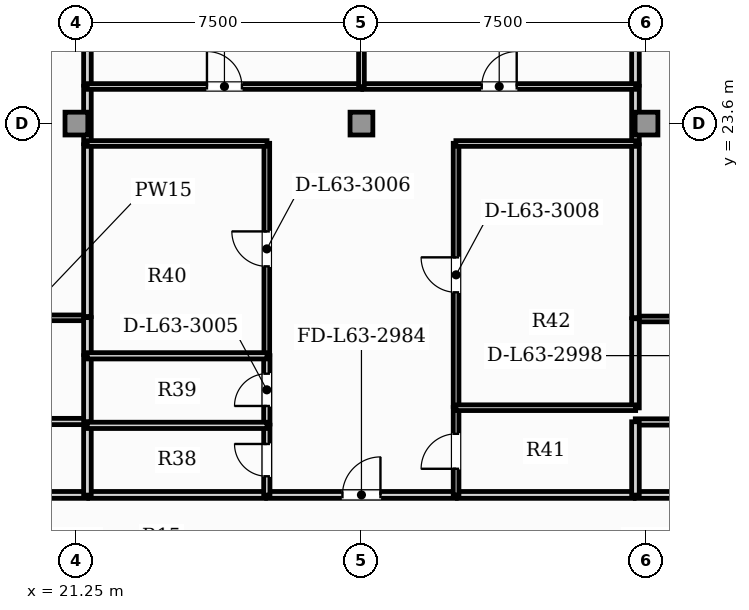
"""IFC4 building model, lengths in metres.
Left out: names, types, materials, properties, quantities, classifications, styles, units other than length and angle.
Written with IfcOpenShell. Run it as: python <this file> out.ifc"""

import sys

from ifc_helpers import new_model, si_unit, direction, frame, frame_2d, origin, origin_2d, place, context, subcontext, project, spatial, rectangle, extrude, element, fill, save


model = new_model("IFC4")
c1 = context("Model", 3, precision=1e-05, world=origin(), true_north=direction((0.0, 1.0)))
c2 = subcontext(c1, "Body", "Model", "MODEL_VIEW")
j1 = project(units=[si_unit("LENGTHUNIT", "METRE"), si_unit("PLANEANGLEUNIT", "RADIAN")], contexts=[c1])
p1 = place(None, origin())
s1 = spatial("IfcSite", under=j1, at=p1, CompositionType="ELEMENT")
p2 = place(p1, origin())
s2 = spatial("IfcBuilding", under=s1, at=p2, CompositionType="ELEMENT")
p3 = place(p2, frame((0.0, 0.0, 256.75)))
s3 = spatial("IfcBuildingStorey", under=s2, at=p3, CompositionType="ELEMENT", Elevation=256.75)
for number, where, z_axis, x_axis in (
    (1, (21.25, 23.6, 0.0), (0.0, 0.0, 1.0), (1.0, 0.0, 0.0)),
    (2, (28.75, 23.6, 0.0), (0.0, 0.0, 1.0), (1.0, 0.0, 0.0)),
    (3, (36.25, 23.6, 0.0), (0.0, 0.0, 1.0), (1.0, 0.0, 0.0)),
):
    element("IfcColumn", number, at=place(p3, frame(where, z_axis=z_axis, x_axis=x_axis)), inside=s3, PredefinedType="COLUMN", context=c2, shape_type="SweptSolid", body=[
        extrude(rectangle(XDim=0.6, YDim=0.6, at=origin_2d()), origin(), (0.0, 0.0, 1.0), 3.85),
    ])
p4 = place(p3, frame((17.627, 13.83, 0.0), z_axis=(0.0, 0.0, 1.0), x_axis=(1.0, 0.0, 0.0)))
e4 = element("IfcWall", 4, at=p4, inside=s3, PredefinedType="PARTITIONING", context=c2, shape_type="SweptSolid", body=[
    extrude(rectangle(XDim=3.918, YDim=0.18, at=frame_2d((1.959, 0.0))), origin(), (0.0, 0.0, 1.0), 3.65),
])
p5 = place(p3, frame((35.955, 13.83, 0.0), z_axis=(0.0, 0.0, 1.0), x_axis=(1.0, 0.0, 0.0)))
e5 = element("IfcWall", 5, at=p5, inside=s3, PredefinedType="PARTITIONING", context=c2, shape_type="SweptSolid", body=[
    extrude(rectangle(XDim=3.944, YDim=0.18, at=frame_2d((1.972, 0.0))), origin(), (0.0, 0.0, 1.0), 3.65),
])
p6 = place(p3, frame((26.255, 13.83, 0.0), z_axis=(0.0, 0.0, 1.0), x_axis=(1.0, 0.0, 0.0)))
e6 = element("IfcWall", 6, at=p6, inside=s3, PredefinedType="PARTITIONING", context=c2, shape_type="SweptSolid", body=[
    extrude(rectangle(XDim=4.99, YDim=0.18, at=frame_2d((2.495, 0.0))), origin(), (0.0, 0.0, 1.0), 3.65),
])
p7 = place(p6, frame((1.995, 0.0, 0.0)))
e7 = element("IfcOpeningElement", 7, at=p7, cuts=e6, PredefinedType="OPENING", context=c2, shape_type="SweptSolid", body=[
    extrude(rectangle(XDim=1.0, YDim=2.15, at=frame_2d((0.5, 1.075))), frame((0.0, 0.1, 0.0), z_axis=(0.0, -1.0, 0.0), x_axis=(1.0, 0.0, 0.0)), (0.0, 0.0, 1.0), 0.2),
])
for number, where, z_axis, x_axis in (
    (8, (21.575, 13.83, 0.0), (0.0, 0.0, 1.0), (1.0, 0.0, 0.0)),
    (9, (31.275, 13.83, 0.0), (0.0, 0.0, 1.0), (1.0, 0.0, 0.0)),
):
    element("IfcWall", number, at=place(p3, frame(where, z_axis=z_axis, x_axis=x_axis)), inside=s3, PredefinedType="PARTITIONING", context=c2, shape_type="SweptSolid", body=[
        extrude(rectangle(XDim=4.65, YDim=0.18, at=frame_2d((2.325, 0.0))), origin(), (0.0, 0.0, 1.0), 3.65),
    ])
p8 = place(p3, frame((17.587, 15.762, 0.0), z_axis=(0.0, 0.0, 1.0), x_axis=(1.0, 0.0, 0.0)))
e10 = element("IfcWall", 10, at=p8, inside=s3, PredefinedType="PLUMBINGWALL", context=c2, shape_type="SweptSolid", body=[
    extrude(rectangle(XDim=3.958, YDim=0.165, at=frame_2d((1.979, 0.0))), origin(), (0.0, 0.0, 1.0), 3.65),
])
p9 = place(p3, frame((21.54, 13.825, 0.0), z_axis=(0.0, 0.0, 1.0), x_axis=(0.0, 1.0, 0.0)))
e11 = element("IfcWall", 11, at=p9, inside=s3, PredefinedType="PARTITIONING", context=c2, shape_type="SweptSolid", body=[
    extrude(rectangle(XDim=1.84, YDim=0.2, at=frame_2d((0.92, 0.0))), origin(), (0.0, 0.0, 1.0), 3.65),
])
p10 = place(p3, frame((17.587, 18.49, 0.0), z_axis=(0.0, 0.0, 1.0), x_axis=(1.0, 0.0, 0.0)))
e12 = element("IfcWall", 12, at=p10, inside=s3, PredefinedType="PARTITIONING", context=c2, shape_type="SweptSolid", body=[
    extrude(rectangle(XDim=3.958, YDim=0.15, at=frame_2d((1.979, 0.0))), origin(), (0.0, 0.0, 1.0), 3.65),
])
p11 = place(p3, frame((21.54, 15.757, 0.0), z_axis=(0.0, 0.0, 1.0), x_axis=(0.0, 1.0, 0.0)))
e13 = element("IfcWall", 13, at=p11, inside=s3, PredefinedType="PARTITIONING", context=c2, shape_type="SweptSolid", body=[
    extrude(rectangle(XDim=1.739, YDim=0.2, at=frame_2d((0.869, 0.0))), origin(), (0.0, 0.0, 1.0), 3.65),
])
p12 = place(p3, frame((21.54, 17.525, 0.0), z_axis=(0.0, 0.0, 1.0), x_axis=(0.0, 1.0, 0.0)))
e14 = element("IfcWall", 14, at=p12, inside=s3, PredefinedType="PARTITIONING", context=c2, shape_type="SweptSolid", body=[
    extrude(rectangle(XDim=0.969, YDim=0.2, at=frame_2d((0.485, 0.0))), origin(), (0.0, 0.0, 1.0), 3.65),
])
p13 = place(p3, frame((21.54, 23.071, 0.0), z_axis=(0.0, 0.0, 1.0), x_axis=(0.0, 1.0, 0.0)))
e15 = element("IfcWall", 15, at=p13, inside=s3, PredefinedType="PARTITIONING", context=c2, shape_type="SweptSolid", body=[
    extrude(rectangle(XDim=1.51, YDim=0.2, at=frame_2d((0.755, 0.0))), origin(), (0.0, 0.0, 1.0), 3.65),
])
p14 = place(p3, frame((21.54, 18.524, 0.0), z_axis=(0.0, 0.0, 1.0), x_axis=(0.0, 1.0, 0.0)))
e16 = element("IfcWall", 16, at=p14, inside=s3, PredefinedType="PARTITIONING", context=c2, shape_type="SweptSolid", body=[
    extrude(rectangle(XDim=4.517, YDim=0.2, at=frame_2d((2.258, 0.0))), origin(), (0.0, 0.0, 1.0), 3.65),
])
p15 = place(p3, frame((21.54, 24.611, 0.0), z_axis=(0.0, 0.0, 1.0), x_axis=(0.0, 1.0, 0.0)))
e17 = element("IfcWall", 17, at=p15, inside=s3, PredefinedType="PARTITIONING", context=c2, shape_type="SweptSolid", body=[
    extrude(rectangle(XDim=2.354, YDim=0.2, at=frame_2d((1.177, 0.0))), origin(), (0.0, 0.0, 1.0), 3.65),
])
p16 = place(p3, frame((35.955, 15.75, 0.0), z_axis=(0.0, 0.0, 1.0), x_axis=(1.0, 0.0, 0.0)))
e18 = element("IfcWall", 18, at=p16, inside=s3, PredefinedType="PLUMBINGWALL", context=c2, shape_type="SweptSolid", body=[
    extrude(rectangle(XDim=3.984, YDim=0.165, at=frame_2d((1.992, 0.0))), origin(), (0.0, 0.0, 1.0), 3.65),
])
p17 = place(p3, frame((35.96, 13.825, 0.0), z_axis=(0.0, 0.0, 1.0), x_axis=(0.0, 1.0, 0.0)))
e19 = element("IfcWall", 19, at=p17, inside=s3, PredefinedType="PARTITIONING", context=c2, shape_type="SweptSolid", body=[
    extrude(rectangle(XDim=1.929, YDim=0.2, at=frame_2d((0.965, 0.0))), origin(), (0.0, 0.0, 1.0), 3.65),
])
p18 = place(p3, frame((35.955, 18.46, 0.0), z_axis=(0.0, 0.0, 1.0), x_axis=(1.0, 0.0, 0.0)))
e20 = element("IfcWall", 20, at=p18, inside=s3, PredefinedType="PARTITIONING", context=c2, shape_type="SweptSolid", body=[
    extrude(rectangle(XDim=3.984, YDim=0.15, at=frame_2d((1.992, 0.0))), origin(), (0.0, 0.0, 1.0), 3.65),
])
p19 = place(p3, frame((35.96, 16.119, 0.0), z_axis=(0.0, 0.0, 1.0), x_axis=(0.0, 1.0, 0.0)))
e21 = element("IfcWall", 21, at=p19, inside=s3, PredefinedType="PARTITIONING", context=c2, shape_type="SweptSolid", body=[
    extrude(rectangle(XDim=2.345, YDim=0.2, at=frame_2d((1.173, 0.0))), origin(), (0.0, 0.0, 1.0), 3.65),
])
p20 = place(p3, frame((35.96, 23.071, 0.0), z_axis=(0.0, 0.0, 1.0), x_axis=(0.0, 1.0, 0.0)))
e22 = element("IfcWall", 22, at=p20, inside=s3, PredefinedType="PARTITIONING", context=c2, shape_type="SweptSolid", body=[
    extrude(rectangle(XDim=1.51, YDim=0.2, at=frame_2d((0.755, 0.0))), origin(), (0.0, 0.0, 1.0), 3.65),
])
p21 = place(p3, frame((35.96, 18.495, 0.0), z_axis=(0.0, 0.0, 1.0), x_axis=(0.0, 1.0, 0.0)))
e23 = element("IfcWall", 23, at=p21, inside=s3, PredefinedType="PARTITIONING", context=c2, shape_type="SweptSolid", body=[
    extrude(rectangle(XDim=4.547, YDim=0.2, at=frame_2d((2.273, 0.0))), origin(), (0.0, 0.0, 1.0), 3.65),
])
p22 = place(p3, frame((35.96, 24.611, 0.0), z_axis=(0.0, 0.0, 1.0), x_axis=(0.0, 1.0, 0.0)))
e24 = element("IfcWall", 24, at=p22, inside=s3, PredefinedType="PARTITIONING", context=c2, shape_type="SweptSolid", body=[
    extrude(rectangle(XDim=2.354, YDim=0.2, at=frame_2d((1.177, 0.0))), origin(), (0.0, 0.0, 1.0), 3.65),
])
p23 = place(p3, frame((26.26, 13.825, 0.0), z_axis=(0.0, 0.0, 1.0), x_axis=(0.0, 1.0, 0.0)))
e25 = element("IfcWall", 25, at=p23, inside=s3, PredefinedType="PLUMBINGWALL", context=c2, shape_type="SweptSolid", body=[
    extrude(rectangle(XDim=1.84, YDim=0.165, at=frame_2d((0.92, 0.0))), origin(), (0.0, 0.0, 1.0), 3.65),
])
p24 = place(p23, frame((0.495, 0.0, 0.0)))
e26 = element("IfcOpeningElement", 26, at=p24, cuts=e25, PredefinedType="OPENING", context=c2, shape_type="SweptSolid", body=[
    extrude(rectangle(XDim=0.85, YDim=2.1, at=frame_2d((0.425, 1.05))), frame((0.0, 0.093, 0.0), z_axis=(0.0, -1.0, 0.0), x_axis=(1.0, 0.0, 0.0)), (0.0, 0.0, 1.0), 0.185),
])
p25 = place(p3, frame((26.26, 15.695, 0.0), z_axis=(0.0, 0.0, 1.0), x_axis=(0.0, 1.0, 0.0)))
e27 = element("IfcWall", 27, at=p25, inside=s3, PredefinedType="PLUMBINGWALL", context=c2, shape_type="SweptSolid", body=[
    extrude(rectangle(XDim=1.8, YDim=0.165, at=frame_2d((0.9, 0.0))), origin(), (0.0, 0.0, 1.0), 3.65),
])
p26 = place(p25, frame((0.475, 0.0, 0.0)))
e28 = element("IfcOpeningElement", 28, at=p26, cuts=e27, PredefinedType="OPENING", context=c2, shape_type="SweptSolid", body=[
    extrude(rectangle(XDim=0.85, YDim=2.1, at=frame_2d((0.425, 1.05))), frame((0.0, 0.093, 0.0), z_axis=(0.0, -1.0, 0.0), x_axis=(1.0, 0.0, 0.0)), (0.0, 0.0, 1.0), 0.185),
])
p27 = place(p3, frame((26.26, 17.525, 0.0), z_axis=(0.0, 0.0, 1.0), x_axis=(0.0, 1.0, 0.0)))
e29 = element("IfcWall", 29, at=p27, inside=s3, PredefinedType="PARTITIONING", context=c2, shape_type="SweptSolid", body=[
    extrude(rectangle(XDim=5.556, YDim=0.15, at=frame_2d((2.778, 0.0))), origin(), (0.0, 0.0, 1.0), 3.65),
])
p28 = place(p27, frame((2.318, 0.0, 0.0)))
e30 = element("IfcOpeningElement", 30, at=p28, cuts=e29, PredefinedType="OPENING", context=c2, shape_type="SweptSolid", body=[
    extrude(rectangle(XDim=0.92, YDim=2.1, at=frame_2d((0.46, 1.05))), frame((0.0, 0.085, 0.0), z_axis=(0.0, -1.0, 0.0), x_axis=(1.0, 0.0, 0.0)), (0.0, 0.0, 1.0), 0.17),
])
p29 = place(p3, frame((21.535, 23.076, 0.0), z_axis=(0.0, 0.0, 1.0), x_axis=(1.0, 0.0, 0.0)))
e31 = element("IfcWall", 31, at=p29, inside=s3, PredefinedType="PARTITIONING", context=c2, shape_type="SweptSolid", body=[
    extrude(rectangle(XDim=4.73, YDim=0.15, at=frame_2d((2.365, 0.0))), origin(), (0.0, 0.0, 1.0), 3.65),
])
p30 = place(p3, frame((31.24, 13.825, 0.0), z_axis=(0.0, 0.0, 1.0), x_axis=(0.0, 1.0, 0.0)))
e32 = element("IfcWall", 32, at=p30, inside=s3, PredefinedType="PARTITIONING", context=c2, shape_type="SweptSolid", body=[
    extrude(rectangle(XDim=2.304, YDim=0.15, at=frame_2d((1.152, 0.0))), origin(), (0.0, 0.0, 1.0), 3.65),
])
p31 = place(p30, frame((0.692, 0.0, 0.0)))
e33 = element("IfcOpeningElement", 33, at=p31, cuts=e32, PredefinedType="OPENING", context=c2, shape_type="SweptSolid", body=[
    extrude(rectangle(XDim=0.92, YDim=2.1, at=frame_2d((0.46, 1.05))), frame((0.0, 0.085, 0.0), z_axis=(0.0, -1.0, 0.0), x_axis=(1.0, 0.0, 0.0)), (0.0, 0.0, 1.0), 0.17),
])
p32 = place(p3, frame((31.24, 16.159, 0.0), z_axis=(0.0, 0.0, 1.0), x_axis=(0.0, 1.0, 0.0)))
e34 = element("IfcWall", 34, at=p32, inside=s3, PredefinedType="PARTITIONING", context=c2, shape_type="SweptSolid", body=[
    extrude(rectangle(XDim=6.922, YDim=0.15, at=frame_2d((3.461, 0.0))), origin(), (0.0, 0.0, 1.0), 3.65),
])
p33 = place(p32, frame((3.001, 0.0, 0.0)))
e35 = element("IfcOpeningElement", 35, at=p33, cuts=e34, PredefinedType="OPENING", context=c2, shape_type="SweptSolid", body=[
    extrude(rectangle(XDim=0.92, YDim=2.1, at=frame_2d((0.46, 1.05))), frame((0.0, 0.085, 0.0), z_axis=(0.0, -1.0, 0.0), x_axis=(1.0, 0.0, 0.0)), (0.0, 0.0, 1.0), 0.17),
])
p34 = place(p3, frame((31.235, 23.076, 0.0), z_axis=(0.0, 0.0, 1.0), x_axis=(1.0, 0.0, 0.0)))
e36 = element("IfcWall", 36, at=p34, inside=s3, PredefinedType="PARTITIONING", context=c2, shape_type="SweptSolid", body=[
    extrude(rectangle(XDim=4.73, YDim=0.15, at=frame_2d((2.365, 0.0))), origin(), (0.0, 0.0, 1.0), 3.65),
])
p35 = place(p3, frame((21.535, 24.576, 0.0), z_axis=(0.0, 0.0, 1.0), x_axis=(1.0, 0.0, 0.0)))
e37 = element("IfcWall", 37, at=p35, inside=s3, PredefinedType="PARTITIONING", context=c2, shape_type="SweptSolid", body=[
    extrude(rectangle(XDim=7.22, YDim=0.15, at=frame_2d((3.61, 0.0))), origin(), (0.0, 0.0, 1.0), 3.65),
])
p36 = place(p35, frame((3.15, 0.0, 0.0)))
e38 = element("IfcOpeningElement", 38, at=p36, cuts=e37, PredefinedType="OPENING", context=c2, shape_type="SweptSolid", body=[
    extrude(rectangle(XDim=0.92, YDim=2.1, at=frame_2d((0.46, 1.05))), frame((0.0, 0.085, 0.0), z_axis=(0.0, -1.0, 0.0), x_axis=(1.0, 0.0, 0.0)), (0.0, 0.0, 1.0), 0.17),
])
p37 = place(p3, frame((28.785, 24.576, 0.0), z_axis=(0.0, 0.0, 1.0), x_axis=(1.0, 0.0, 0.0)))
e39 = element("IfcWall", 39, at=p37, inside=s3, PredefinedType="PARTITIONING", context=c2, shape_type="SweptSolid", body=[
    extrude(rectangle(XDim=7.18, YDim=0.15, at=frame_2d((3.59, 0.0))), origin(), (0.0, 0.0, 1.0), 3.65),
])
p38 = place(p37, frame((3.13, 0.0, 0.0)))
e40 = element("IfcOpeningElement", 40, at=p38, cuts=e39, PredefinedType="OPENING", context=c2, shape_type="SweptSolid", body=[
    extrude(rectangle(XDim=0.92, YDim=2.1, at=frame_2d((0.46, 1.05))), frame((0.0, 0.085, 0.0), z_axis=(0.0, -1.0, 0.0), x_axis=(1.0, 0.0, 0.0)), (0.0, 0.0, 1.0), 0.17),
])
for number, where, z_axis, x_axis in (
    (41, (21.535, 15.66, 0.0), (0.0, 0.0, 1.0), (1.0, 0.0, 0.0)),
    (42, (21.535, 17.49, 0.0), (0.0, 0.0, 1.0), (1.0, 0.0, 0.0)),
):
    element("IfcWall", number, at=place(p3, frame(where, z_axis=z_axis, x_axis=x_axis)), inside=s3, PredefinedType="PLUMBINGWALL", context=c2, shape_type="SweptSolid", body=[
        extrude(rectangle(XDim=4.73, YDim=0.165, at=frame_2d((2.365, 0.0))), origin(), (0.0, 0.0, 1.0), 3.65),
    ])
p39 = place(p3, frame((31.235, 16.125, 0.0), z_axis=(0.0, 0.0, 1.0), x_axis=(1.0, 0.0, 0.0)))
e43 = element("IfcWall", 43, at=p39, inside=s3, PredefinedType="PARTITIONING", context=c2, shape_type="SweptSolid", body=[
    extrude(rectangle(XDim=4.73, YDim=0.15, at=frame_2d((2.365, 0.0))), origin(), (0.0, 0.0, 1.0), 3.65),
])
p40 = place(p3, frame((28.75, 24.571, 0.0), z_axis=(0.0, 0.0, 1.0), x_axis=(0.0, 1.0, 0.0)))
e44 = element("IfcWall", 44, at=p40, inside=s3, PredefinedType="PARTITIONING", context=c2, shape_type="SweptSolid", body=[
    extrude(rectangle(XDim=5.041, YDim=0.15, at=frame_2d((2.521, 0.0))), origin(), (0.0, 0.0, 1.0), 3.295),
])
p41 = place(p7, origin())
e45 = element("IfcDoor", 45, at=p41, inside=s3, OperationType="SINGLE_SWING_RIGHT", PredefinedType="DOOR", context=c2, shape_type="SweptSolid", body=[
    extrude(rectangle(XDim=1.0, YDim=2.15, at=frame_2d((0.5, 1.075))), frame((0.0, 0.025, 0.0), z_axis=(0.0, -1.0, 0.0), x_axis=(1.0, 0.0, 0.0)), (0.0, 0.0, 1.0), 0.05),
])
fill(e7, e45)
p42 = place(p24, origin())
e46 = element("IfcDoor", 46, at=p42, inside=s3, OperationType="SINGLE_SWING_RIGHT", PredefinedType="DOOR", context=c2, shape_type="SweptSolid", body=[
    extrude(rectangle(XDim=0.85, YDim=2.1, at=frame_2d((0.425, 1.05))), frame((0.0, 0.025, 0.0), z_axis=(0.0, -1.0, 0.0), x_axis=(1.0, 0.0, 0.0)), (0.0, 0.0, 1.0), 0.05),
])
fill(e26, e46)
p43 = place(p26, origin())
e47 = element("IfcDoor", 47, at=p43, inside=s3, OperationType="SINGLE_SWING_LEFT", PredefinedType="DOOR", context=c2, shape_type="SweptSolid", body=[
    extrude(rectangle(XDim=0.85, YDim=2.1, at=frame_2d((0.425, 1.05))), frame((0.0, 0.025, 0.0), z_axis=(0.0, -1.0, 0.0), x_axis=(1.0, 0.0, 0.0)), (0.0, 0.0, 1.0), 0.05),
])
fill(e28, e47)
p44 = place(p28, origin())
e48 = element("IfcDoor", 48, at=p44, inside=s3, OperationType="SINGLE_SWING_RIGHT", PredefinedType="DOOR", context=c2, shape_type="SweptSolid", body=[
    extrude(rectangle(XDim=0.92, YDim=2.1, at=frame_2d((0.46, 1.05))), frame((0.0, 0.025, 0.0), z_axis=(0.0, -1.0, 0.0), x_axis=(1.0, 0.0, 0.0)), (0.0, 0.0, 1.0), 0.05),
])
fill(e30, e48)
p45 = place(p31, origin())
e49 = element("IfcDoor", 49, at=p45, inside=s3, OperationType="SINGLE_SWING_LEFT", PredefinedType="DOOR", context=c2, shape_type="SweptSolid", body=[
    extrude(rectangle(XDim=0.92, YDim=2.1, at=frame_2d((0.46, 1.05))), frame((0.0, 0.025, 0.0), z_axis=(0.0, -1.0, 0.0), x_axis=(1.0, 0.0, 0.0)), (0.0, 0.0, 1.0), 0.05),
])
fill(e33, e49)
p46 = place(p33, origin())
e50 = element("IfcDoor", 50, at=p46, inside=s3, OperationType="SINGLE_SWING_RIGHT", PredefinedType="DOOR", context=c2, shape_type="SweptSolid", body=[
    extrude(rectangle(XDim=0.92, YDim=2.1, at=frame_2d((0.46, 1.05))), frame((0.0, 0.025, 0.0), z_axis=(0.0, -1.0, 0.0), x_axis=(1.0, 0.0, 0.0)), (0.0, 0.0, 1.0), 0.05),
])
fill(e35, e50)
p47 = place(p36, origin())
e51 = element("IfcDoor", 51, at=p47, inside=s3, OperationType="SINGLE_SWING_LEFT", PredefinedType="DOOR", context=c2, shape_type="SweptSolid", body=[
    extrude(rectangle(XDim=0.92, YDim=2.1, at=frame_2d((0.46, 1.05))), frame((0.0, 0.025, 0.0), z_axis=(0.0, -1.0, 0.0), x_axis=(1.0, 0.0, 0.0)), (0.0, 0.0, 1.0), 0.05),
])
fill(e38, e51)
p48 = place(p38, origin())
e52 = element("IfcDoor", 52, at=p48, inside=s3, OperationType="SINGLE_SWING_RIGHT", PredefinedType="DOOR", context=c2, shape_type="SweptSolid", body=[
    extrude(rectangle(XDim=0.92, YDim=2.1, at=frame_2d((0.46, 1.05))), frame((0.0, 0.025, 0.0), z_axis=(0.0, -1.0, 0.0), x_axis=(1.0, 0.0, 0.0)), (0.0, 0.0, 1.0), 0.05),
])
fill(e40, e52)
save(model, sys.argv[1])
